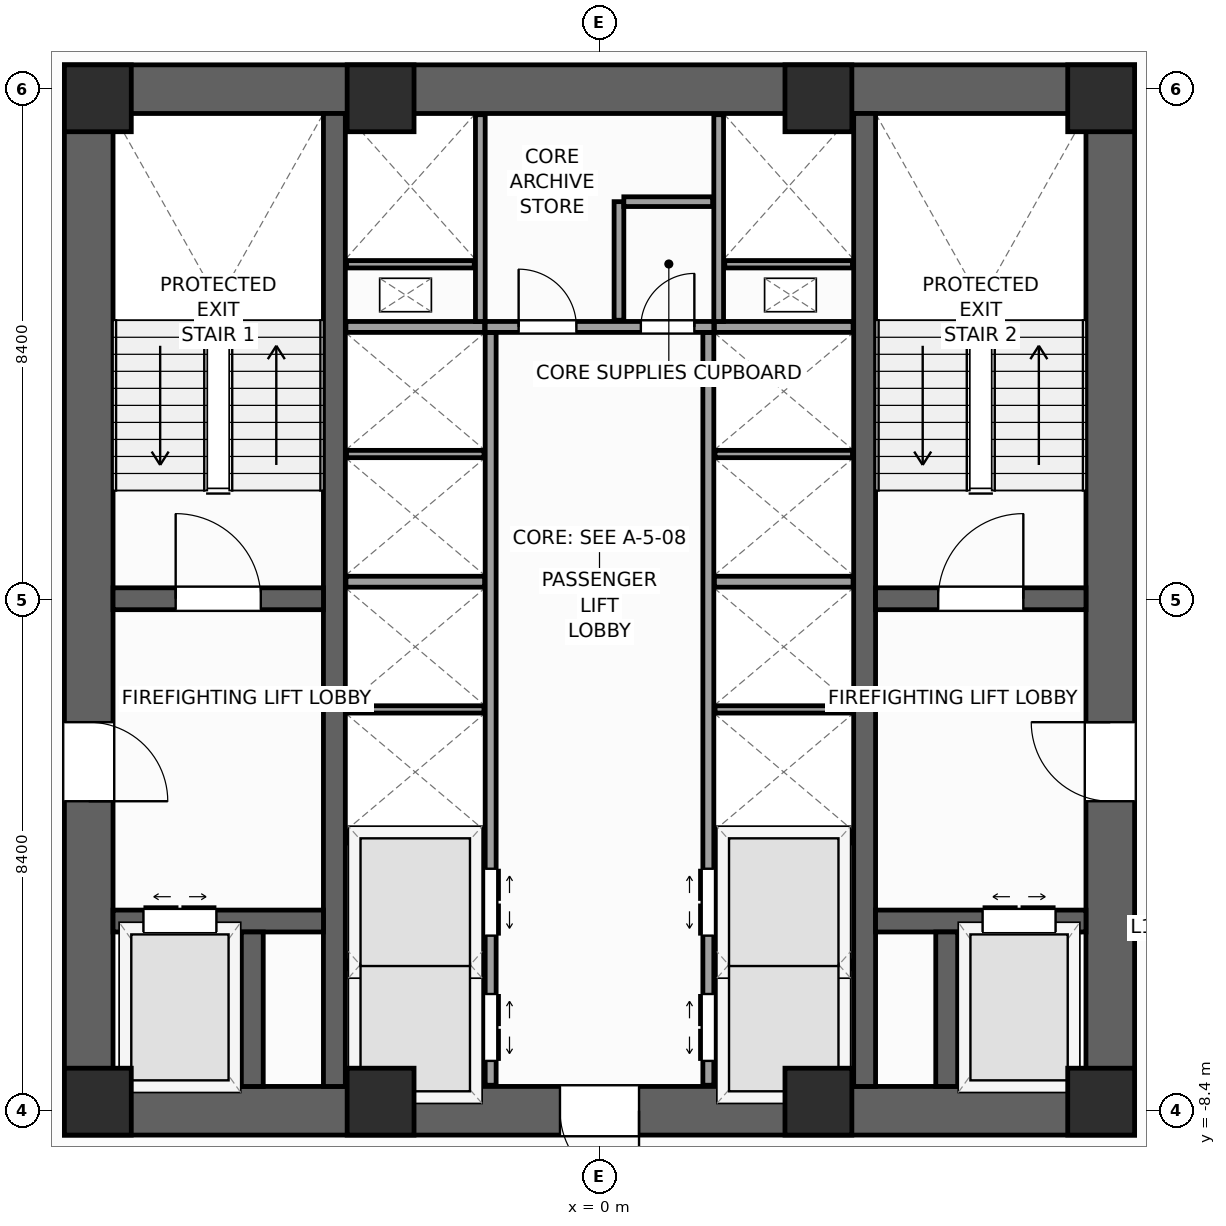
"""IFC4 building model, lengths in metres.
Left out: names, types, materials, properties, quantities, classifications, styles, units other than length and angle.
Written with IfcOpenShell. Run it as: python <this file> out.ifc"""

import sys

from ifc_helpers import new_model, si_unit, direction, frame, frame_2d, origin, origin_2d, place, context, subcontext, project, spatial, rectangle, extrude, source, transform, mapped, element, fill, save


model = new_model("IFC4")
c1 = context("Model", 3, precision=1e-05, world=origin(), true_north=direction((0.0, 1.0)))
c2 = subcontext(c1, "Body", "Model", "MODEL_VIEW")
j1 = project(units=[si_unit("LENGTHUNIT", "METRE"), si_unit("PLANEANGLEUNIT", "RADIAN")], contexts=[c1])
p1 = place(None, origin())
s1 = spatial("IfcSite", under=j1, at=p1, CompositionType="ELEMENT")
p2 = place(p1, origin())
s2 = spatial("IfcBuilding", under=s1, at=p2, CompositionType="ELEMENT")
p3 = place(p2, frame((0.0, 0.0, 54.0)))
s3 = spatial("IfcBuildingStorey", under=s2, at=p3, CompositionType="ELEMENT", Elevation=54.0)
p4 = place(p3, frame((-8.8, -8.4, 0.0), z_axis=(0.0, 0.0, 1.0), x_axis=(1.0, 0.0, 0.0)))
e1 = element("IfcWall", 1, at=p4, inside=s3, PredefinedType="SHEAR", context=c2, shape_type="SweptSolid", body=[
    extrude(rectangle(XDim=17.6, YDim=0.8, at=frame_2d((8.8, 0.0))), origin(), (0.0, 0.0, 1.0), 4.0),
])
p5 = place(p4, frame((8.15, 0.0, 0.0)))
e2 = element("IfcOpeningElement", 2, at=p5, cuts=e1, PredefinedType="OPENING", context=c2, shape_type="SweptSolid", body=[
    extrude(rectangle(XDim=1.3, YDim=2.2, at=frame_2d((0.65, 1.1))), frame((0.0, 0.41, 0.0), z_axis=(0.0, -1.0, 0.0), x_axis=(1.0, 0.0, 0.0)), (0.0, 0.0, 1.0), 0.82),
])
p6 = place(p3, frame((-8.8, 8.4, 0.0), z_axis=(0.0, 0.0, 1.0), x_axis=(1.0, 0.0, 0.0)))
e3 = element("IfcWall", 3, at=p6, inside=s3, PredefinedType="SHEAR", context=c2, shape_type="SweptSolid", body=[
    extrude(rectangle(XDim=17.6, YDim=0.8, at=frame_2d((8.8, 0.0))), origin(), (0.0, 0.0, 1.0), 4.0),
])
p7 = place(p3, frame((-8.4, -8.0, 0.0), z_axis=(0.0, 0.0, 1.0), x_axis=(0.0, 1.0, 0.0)))
e4 = element("IfcWall", 4, at=p7, inside=s3, PredefinedType="SHEAR", context=c2, shape_type="SweptSolid", body=[
    extrude(rectangle(XDim=16.0, YDim=0.8, at=frame_2d((8.0, 0.0))), origin(), (0.0, 0.0, 1.0), 4.0),
])
p8 = place(p7, frame((4.69, 0.0, 0.0)))
e5 = element("IfcOpeningElement", 5, at=p8, cuts=e4, PredefinedType="OPENING", context=c2, shape_type="SweptSolid", body=[
    extrude(rectangle(XDim=1.3, YDim=2.2, at=frame_2d((0.65, 1.1))), frame((0.0, 0.41, 0.0), z_axis=(0.0, -1.0, 0.0), x_axis=(1.0, 0.0, 0.0)), (0.0, 0.0, 1.0), 0.82),
])
p9 = place(p3, frame((8.4, -8.0, 0.0), z_axis=(0.0, 0.0, 1.0), x_axis=(0.0, 1.0, 0.0)))
e6 = element("IfcWall", 6, at=p9, inside=s3, PredefinedType="SHEAR", context=c2, shape_type="SweptSolid", body=[
    extrude(rectangle(XDim=16.0, YDim=0.8, at=frame_2d((8.0, 0.0))), origin(), (0.0, 0.0, 1.0), 4.0),
])
p10 = place(p9, frame((4.69, 0.0, 0.0)))
e7 = element("IfcOpeningElement", 7, at=p10, cuts=e6, PredefinedType="OPENING", context=c2, shape_type="SweptSolid", body=[
    extrude(rectangle(XDim=1.3, YDim=2.2, at=frame_2d((0.65, 1.1))), frame((0.0, 0.41, 0.0), z_axis=(0.0, -1.0, 0.0), x_axis=(1.0, 0.0, 0.0)), (0.0, 0.0, 1.0), 0.82),
])
for number, where, z_axis, x_axis in (
    (8, (-4.36, -8.0, 0.0), (0.0, 0.0, 1.0), (0.0, 1.0, 0.0)),
    (9, (4.36, -8.0, 0.0), (0.0, 0.0, 1.0), (0.0, 1.0, 0.0)),
):
    element("IfcWall", number, at=place(p3, frame(where, z_axis=z_axis, x_axis=x_axis)), inside=s3, PredefinedType="SHEAR", context=c2, shape_type="SweptSolid", body=[
        extrude(rectangle(XDim=16.0, YDim=0.36, at=frame_2d((8.0, 0.0))), origin(), (0.0, 0.0, 1.0), 4.0),
    ])
p11 = place(p3, frame((-8.0, 0.02, 0.0), z_axis=(0.0, 0.0, 1.0), x_axis=(1.0, 0.0, 0.0)))
e10 = element("IfcWall", 10, at=p11, inside=s3, PredefinedType="SHEAR", context=c2, shape_type="SweptSolid", body=[
    extrude(rectangle(XDim=3.46, YDim=0.36, at=frame_2d((1.73, 0.0))), origin(), (0.0, 0.0, 1.0), 4.0),
])
p12 = place(p11, frame((1.03, 0.0, 0.0)))
e11 = element("IfcOpeningElement", 11, at=p12, cuts=e10, PredefinedType="OPENING", context=c2, shape_type="SweptSolid", body=[
    extrude(rectangle(XDim=1.4, YDim=2.2, at=frame_2d((0.7, 1.1))), frame((0.0, 0.19, 0.0), z_axis=(0.0, -1.0, 0.0), x_axis=(1.0, 0.0, 0.0)), (0.0, 0.0, 1.0), 0.38),
])
p13 = place(p3, frame((4.54, 0.02, 0.0), z_axis=(0.0, 0.0, 1.0), x_axis=(1.0, 0.0, 0.0)))
e12 = element("IfcWall", 12, at=p13, inside=s3, PredefinedType="SHEAR", context=c2, shape_type="SweptSolid", body=[
    extrude(rectangle(XDim=3.46, YDim=0.36, at=frame_2d((1.73, 0.0))), origin(), (0.0, 0.0, 1.0), 4.0),
])
p14 = place(p13, frame((1.03, 0.0, 0.0)))
e13 = element("IfcOpeningElement", 13, at=p14, cuts=e12, PredefinedType="OPENING", context=c2, shape_type="SweptSolid", body=[
    extrude(rectangle(XDim=1.4, YDim=2.2, at=frame_2d((0.7, 1.1))), frame((0.0, 0.19, 0.0), z_axis=(0.0, -1.0, 0.0), x_axis=(1.0, 0.0, 0.0)), (0.0, 0.0, 1.0), 0.38),
])
p15 = place(p3, frame((-8.0, -5.28, 0.0), z_axis=(0.0, 0.0, 1.0), x_axis=(1.0, 0.0, 0.0)))
e14 = element("IfcWall", 14, at=p15, inside=s3, PredefinedType="SHEAR", context=c2, shape_type="SweptSolid", body=[
    extrude(rectangle(XDim=3.46, YDim=0.36, at=frame_2d((1.73, 0.0))), origin(), (0.0, 0.0, 1.0), 4.0),
])
p16 = place(p15, frame((0.5, 0.0, 0.0)))
e15 = element("IfcOpeningElement", 15, at=p16, cuts=e14, PredefinedType="OPENING", context=c2, shape_type="SweptSolid", body=[
    extrude(rectangle(XDim=1.2, YDim=2.25, at=frame_2d((0.6, 1.125))), frame((0.0, 0.19, 0.0), z_axis=(0.0, -1.0, 0.0), x_axis=(1.0, 0.0, 0.0)), (0.0, 0.0, 1.0), 0.38),
])
p17 = place(p3, frame((4.54, -5.28, 0.0), z_axis=(0.0, 0.0, 1.0), x_axis=(1.0, 0.0, 0.0)))
e16 = element("IfcWall", 16, at=p17, inside=s3, PredefinedType="SHEAR", context=c2, shape_type="SweptSolid", body=[
    extrude(rectangle(XDim=3.46, YDim=0.36, at=frame_2d((1.73, 0.0))), origin(), (0.0, 0.0, 1.0), 4.0),
])
p18 = place(p17, frame((1.76, 0.0, 0.0)))
e17 = element("IfcOpeningElement", 17, at=p18, cuts=e16, PredefinedType="OPENING", context=c2, shape_type="SweptSolid", body=[
    extrude(rectangle(XDim=1.2, YDim=2.25, at=frame_2d((0.6, 1.125))), frame((0.0, 0.19, 0.0), z_axis=(0.0, -1.0, 0.0), x_axis=(1.0, 0.0, 0.0)), (0.0, 0.0, 1.0), 0.38),
])
for number, where, z_axis, x_axis in (
    (18, (-5.71, -8.0, 0.0), (0.0, 0.0, 1.0), (0.0, 1.0, 0.0)),
    (19, (5.71, -8.0, 0.0), (0.0, 0.0, 1.0), (0.0, 1.0, 0.0)),
):
    element("IfcWall", number, at=place(p3, frame(where, z_axis=z_axis, x_axis=x_axis)), inside=s3, PredefinedType="SHEAR", context=c2, shape_type="SweptSolid", body=[
        extrude(rectangle(XDim=2.54, YDim=0.36, at=frame_2d((1.27, 0.0))), origin(), (0.0, 0.0, 1.0), 4.0),
    ])
m1 = source(origin(), c2, "Body", "SweptSolid", [
    extrude(rectangle(XDim=1.1, YDim=1.1, at=origin_2d()), origin(), (0.0, 0.0, 1.0), 4.0),
])
for number, where, z_axis, x_axis in (
    (20, (-8.25, -8.25, 0.0), (0.0, 0.0, 1.0), (1.0, 0.0, 0.0)),
    (21, (8.25, -8.25, 0.0), (0.0, 0.0, 1.0), (1.0, 0.0, 0.0)),
    (22, (8.25, 8.25, 0.0), (0.0, 0.0, 1.0), (1.0, 0.0, 0.0)),
    (23, (-8.25, 8.25, 0.0), (0.0, 0.0, 1.0), (1.0, 0.0, 0.0)),
    (24, (-3.6, -8.25, 0.0), (0.0, 0.0, 1.0), (1.0, 0.0, 0.0)),
    (25, (3.6, -8.25, 0.0), (0.0, 0.0, 1.0), (1.0, 0.0, 0.0)),
    (26, (-3.6, 8.25, 0.0), (0.0, 0.0, 1.0), (1.0, 0.0, 0.0)),
    (27, (3.6, 8.25, 0.0), (0.0, 0.0, 1.0), (1.0, 0.0, 0.0)),
):
    element("IfcColumn", number, at=place(p3, frame(where, z_axis=z_axis, x_axis=x_axis)), inside=s3, PredefinedType="PILASTER", context=c2, shape_type="MappedRepresentation", body=[
        mapped(m1, transform((0.0, 0.0, 0.0), scale=1.0)),
    ])
p19 = place(p3, frame((-1.79, -7.98, 0.0), z_axis=(0.0, 0.0, 1.0), x_axis=(0.0, 1.0, 0.0)))
e28 = element("IfcWall", 28, at=p19, inside=s3, PredefinedType="PARTITIONING", context=c2, shape_type="SweptSolid", body=[
    extrude(rectangle(XDim=12.38, YDim=0.18, at=frame_2d((6.19, 0.0))), origin(), (0.0, 0.0, 1.0), 3.72),
])
p20 = place(p19, frame((0.4, 0.0, 0.0)))
e29 = element("IfcOpeningElement", 29, at=p20, cuts=e28, PredefinedType="OPENING", context=c2, shape_type="SweptSolid", body=[
    extrude(rectangle(XDim=1.1, YDim=2.2, at=frame_2d((0.55, 1.1))), frame((0.0, 0.1, 0.0), z_axis=(0.0, -1.0, 0.0), x_axis=(1.0, 0.0, 0.0)), (0.0, 0.0, 1.0), 0.2),
])
p21 = place(p19, frame((2.46, 0.0, 0.0)))
e30 = element("IfcOpeningElement", 30, at=p21, cuts=e28, PredefinedType="OPENING", context=c2, shape_type="SweptSolid", body=[
    extrude(rectangle(XDim=1.1, YDim=2.2, at=frame_2d((0.55, 1.1))), frame((0.0, 0.1, 0.0), z_axis=(0.0, -1.0, 0.0), x_axis=(1.0, 0.0, 0.0)), (0.0, 0.0, 1.0), 0.2),
])
p22 = place(p3, frame((1.79, -7.98, 0.0), z_axis=(0.0, 0.0, 1.0), x_axis=(0.0, 1.0, 0.0)))
e31 = element("IfcWall", 31, at=p22, inside=s3, PredefinedType="PARTITIONING", context=c2, shape_type="SweptSolid", body=[
    extrude(rectangle(XDim=12.38, YDim=0.18, at=frame_2d((6.19, 0.0))), origin(), (0.0, 0.0, 1.0), 3.72),
])
p23 = place(p22, frame((0.4, 0.0, 0.0)))
e32 = element("IfcOpeningElement", 32, at=p23, cuts=e31, PredefinedType="OPENING", context=c2, shape_type="SweptSolid", body=[
    extrude(rectangle(XDim=1.1, YDim=2.2, at=frame_2d((0.55, 1.1))), frame((0.0, 0.1, 0.0), z_axis=(0.0, -1.0, 0.0), x_axis=(1.0, 0.0, 0.0)), (0.0, 0.0, 1.0), 0.2),
])
p24 = place(p22, frame((2.46, 0.0, 0.0)))
e33 = element("IfcOpeningElement", 33, at=p24, cuts=e31, PredefinedType="OPENING", context=c2, shape_type="SweptSolid", body=[
    extrude(rectangle(XDim=1.1, YDim=2.2, at=frame_2d((0.55, 1.1))), frame((0.0, 0.1, 0.0), z_axis=(0.0, -1.0, 0.0), x_axis=(1.0, 0.0, 0.0)), (0.0, 0.0, 1.0), 0.2),
])
p25 = place(p3, frame((-1.88, 4.49, 0.0), z_axis=(0.0, 0.0, 1.0), x_axis=(1.0, 0.0, 0.0)))
e34 = element("IfcWall", 34, at=p25, inside=s3, PredefinedType="PARTITIONING", context=c2, shape_type="SweptSolid", body=[
    extrude(rectangle(XDim=3.76, YDim=0.18, at=frame_2d((1.88, 0.0))), origin(), (0.0, 0.0, 1.0), 3.72),
])
p26 = place(p25, frame((0.55, 0.0, 0.0)))
e35 = element("IfcOpeningElement", 35, at=p26, cuts=e34, PredefinedType="OPENING", context=c2, shape_type="SweptSolid", body=[
    extrude(rectangle(XDim=0.95, YDim=2.1, at=frame_2d((0.475, 1.05))), frame((0.0, 0.1, 0.0), z_axis=(0.0, -1.0, 0.0), x_axis=(1.0, 0.0, 0.0)), (0.0, 0.0, 1.0), 0.2),
])
p27 = place(p25, frame((2.56, 0.0, 0.0)))
e36 = element("IfcOpeningElement", 36, at=p27, cuts=e34, PredefinedType="OPENING", context=c2, shape_type="SweptSolid", body=[
    extrude(rectangle(XDim=0.88, YDim=2.1, at=frame_2d((0.44, 1.05))), frame((0.0, 0.1, 0.0), z_axis=(0.0, -1.0, 0.0), x_axis=(1.0, 0.0, 0.0)), (0.0, 0.0, 1.0), 0.2),
])
for number, where, z_axis, x_axis in (
    (37, (-4.17, -3.9, 0.0), (0.0, 0.0, 1.0), (1.0, 0.0, 0.0)),
    (38, (1.89, -3.9, 0.0), (0.0, 0.0, 1.0), (1.0, 0.0, 0.0)),
    (39, (-4.17, 0.3, 0.0), (0.0, 0.0, 1.0), (1.0, 0.0, 0.0)),
    (40, (1.89, 0.3, 0.0), (0.0, 0.0, 1.0), (1.0, 0.0, 0.0)),
    (41, (-4.17, 4.49, 0.0), (0.0, 0.0, 1.0), (1.0, 0.0, 0.0)),
    (42, (1.89, 4.49, 0.0), (0.0, 0.0, 1.0), (1.0, 0.0, 0.0)),
):
    element("IfcWall", number, at=place(p3, frame(where, z_axis=z_axis, x_axis=x_axis)), inside=s3, PredefinedType="PARTITIONING", context=c2, shape_type="SweptSolid", body=[
        extrude(rectangle(XDim=2.28, YDim=0.18, at=frame_2d((1.14, 0.0))), origin(), (0.0, 0.0, 1.0), 3.72),
    ])
for number, where, z_axis, x_axis in (
    (43, (-4.16, -6.0, 0.0), (0.0, 0.0, 1.0), (1.0, 0.0, 0.0)),
    (44, (1.9, -6.0, 0.0), (0.0, 0.0, 1.0), (1.0, 0.0, 0.0)),
    (45, (-4.16, -1.8, 0.0), (0.0, 0.0, 1.0), (1.0, 0.0, 0.0)),
    (46, (1.9, -1.8, 0.0), (0.0, 0.0, 1.0), (1.0, 0.0, 0.0)),
    (47, (-4.16, 2.4, 0.0), (0.0, 0.0, 1.0), (1.0, 0.0, 0.0)),
    (48, (1.9, 2.4, 0.0), (0.0, 0.0, 1.0), (1.0, 0.0, 0.0)),
):
    element("IfcWall", number, at=place(p3, frame(where, z_axis=z_axis, x_axis=x_axis)), inside=s3, PredefinedType="PARTITIONING", context=c2, shape_type="SweptSolid", body=[
        extrude(rectangle(XDim=2.26, YDim=0.12, at=frame_2d((1.13, 0.0))), origin(), (0.0, 0.0, 1.0), 3.72),
    ])
for number, where, z_axis, x_axis in (
    (49, (-1.96, 4.58, 0.0), (0.0, 0.0, 1.0), (0.0, 1.0, 0.0)),
    (50, (1.96, 4.58, 0.0), (0.0, 0.0, 1.0), (0.0, 1.0, 0.0)),
):
    element("IfcWall", number, at=place(p3, frame(where, z_axis=z_axis, x_axis=x_axis)), inside=s3, PredefinedType="PARTITIONING", context=c2, shape_type="SweptSolid", body=[
        extrude(rectangle(XDim=3.4, YDim=0.16, at=frame_2d((1.7, 0.0))), origin(), (0.0, 0.0, 1.0), 3.72),
    ])
for number, where, z_axis, x_axis in (
    (51, (-4.16, 5.52, 0.0), (0.0, 0.0, 1.0), (1.0, 0.0, 0.0)),
    (52, (2.06, 5.52, 0.0), (0.0, 0.0, 1.0), (1.0, 0.0, 0.0)),
):
    element("IfcWall", number, at=place(p3, frame(where, z_axis=z_axis, x_axis=x_axis)), inside=s3, PredefinedType="PARTITIONING", context=c2, shape_type="SweptSolid", body=[
        extrude(rectangle(XDim=2.1, YDim=0.12, at=frame_2d((1.05, 0.0))), origin(), (0.0, 0.0, 1.0), 3.72),
    ])
p28 = place(p3, frame((0.32, 4.6, 0.0), z_axis=(0.0, 0.0, 1.0), x_axis=(0.0, 1.0, 0.0)))
e53 = element("IfcWall", 53, at=p28, inside=s3, PredefinedType="PARTITIONING", context=c2, shape_type="SweptSolid", body=[
    extrude(rectangle(XDim=1.95, YDim=0.16, at=frame_2d((0.975, 0.0))), origin(), (0.0, 0.0, 1.0), 3.72),
])
p29 = place(p3, frame((0.4, 6.55, 0.0), z_axis=(0.0, 0.0, 1.0), x_axis=(1.0, 0.0, 0.0)))
e54 = element("IfcWall", 54, at=p29, inside=s3, PredefinedType="PARTITIONING", context=c2, shape_type="SweptSolid", body=[
    extrude(rectangle(XDim=1.46, YDim=0.16, at=frame_2d((0.73, 0.0))), origin(), (0.0, 0.0, 1.0), 3.72),
])
m2 = source(origin(), c2, "Body", "SweptSolid", [
    extrude(rectangle(XDim=1.4, YDim=2.2, at=frame_2d((0.7, 1.1))), frame((0.0, 0.025, 0.0), z_axis=(0.0, -1.0, 0.0), x_axis=(1.0, 0.0, 0.0)), (0.0, 0.0, 1.0), 0.05),
])
p30 = place(p12, origin())
e55 = element("IfcDoor", 55, at=p30, inside=s3, OperationType="SINGLE_SWING_LEFT", PredefinedType="DOOR", context=c2, shape_type="MappedRepresentation", body=[
    mapped(m2, transform((0.0, 0.0, 0.0), scale=1.0)),
])
fill(e11, e55)
p31 = place(p14, origin())
e56 = element("IfcDoor", 56, at=p31, inside=s3, OperationType="SINGLE_SWING_RIGHT", PredefinedType="DOOR", context=c2, shape_type="MappedRepresentation", body=[
    mapped(m2, transform((0.0, 0.0, 0.0), scale=1.0)),
])
fill(e13, e56)
m3 = source(origin(), c2, "Body", "SweptSolid", [
    extrude(rectangle(XDim=1.3, YDim=2.2, at=frame_2d((0.65, 1.1))), frame((0.0, 0.025, 0.0), z_axis=(0.0, -1.0, 0.0), x_axis=(1.0, 0.0, 0.0)), (0.0, 0.0, 1.0), 0.05),
])
p32 = place(p8, frame((1.3, 0.0, 0.0), z_axis=(0.0, 0.0, 1.0), x_axis=(-1.0, 0.0, 0.0)))
e57 = element("IfcDoor", 57, at=p32, inside=s3, OperationType="SINGLE_SWING_LEFT", PredefinedType="DOOR", context=c2, shape_type="MappedRepresentation", body=[
    mapped(m3, transform((0.0, 0.0, 0.0), scale=1.0)),
])
fill(e5, e57)
p33 = place(p10, origin())
e58 = element("IfcDoor", 58, at=p33, inside=s3, OperationType="SINGLE_SWING_RIGHT", PredefinedType="DOOR", context=c2, shape_type="MappedRepresentation", body=[
    mapped(m3, transform((0.0, 0.0, 0.0), scale=1.0)),
])
fill(e7, e58)
p34 = place(p5, frame((1.3, 0.0, 0.0), z_axis=(0.0, 0.0, 1.0), x_axis=(-1.0, 0.0, 0.0)))
e59 = element("IfcDoor", 59, at=p34, inside=s3, OperationType="SINGLE_SWING_RIGHT", PredefinedType="DOOR", context=c2, shape_type="MappedRepresentation", body=[
    mapped(m3, transform((0.0, 0.0, 0.0), scale=1.0)),
])
fill(e2, e59)
m4 = source(origin(), c2, "Body", "SweptSolid", [
    extrude(rectangle(XDim=1.2, YDim=2.25, at=frame_2d((0.6, 1.125))), frame((0.0, 0.025, 0.0), z_axis=(0.0, -1.0, 0.0), x_axis=(1.0, 0.0, 0.0)), (0.0, 0.0, 1.0), 0.05),
])
p35 = place(p16, origin())
e60 = element("IfcDoor", 60, at=p35, inside=s3, OperationType="DOUBLE_DOOR_SLIDING", PredefinedType="DOOR", context=c2, shape_type="MappedRepresentation", body=[
    mapped(m4, transform((0.0, 0.0, 0.0), scale=1.0)),
])
fill(e15, e60)
p36 = place(p18, origin())
e61 = element("IfcDoor", 61, at=p36, inside=s3, OperationType="DOUBLE_DOOR_SLIDING", PredefinedType="DOOR", context=c2, shape_type="MappedRepresentation", body=[
    mapped(m4, transform((0.0, 0.0, 0.0), scale=1.0)),
])
fill(e17, e61)
m5 = source(origin(), c2, "Body", "SweptSolid", [
    extrude(rectangle(XDim=1.1, YDim=2.2, at=frame_2d((0.55, 1.1))), frame((0.0, 0.025, 0.0), z_axis=(0.0, -1.0, 0.0), x_axis=(1.0, 0.0, 0.0)), (0.0, 0.0, 1.0), 0.05),
])
p37 = place(p20, frame((1.1, 0.0, 0.0), z_axis=(0.0, 0.0, 1.0), x_axis=(-1.0, 0.0, 0.0)))
e62 = element("IfcDoor", 62, at=p37, inside=s3, OperationType="DOUBLE_DOOR_SLIDING", PredefinedType="DOOR", context=c2, shape_type="MappedRepresentation", body=[
    mapped(m5, transform((0.0, 0.0, 0.0), scale=1.0)),
])
fill(e29, e62)
p38 = place(p21, frame((1.1, 0.0, 0.0), z_axis=(0.0, 0.0, 1.0), x_axis=(-1.0, 0.0, 0.0)))
e63 = element("IfcDoor", 63, at=p38, inside=s3, OperationType="DOUBLE_DOOR_SLIDING", PredefinedType="DOOR", context=c2, shape_type="MappedRepresentation", body=[
    mapped(m5, transform((0.0, 0.0, 0.0), scale=1.0)),
])
fill(e30, e63)
p39 = place(p23, origin())
e64 = element("IfcDoor", 64, at=p39, inside=s3, OperationType="DOUBLE_DOOR_SLIDING", PredefinedType="DOOR", context=c2, shape_type="MappedRepresentation", body=[
    mapped(m5, transform((0.0, 0.0, 0.0), scale=1.0)),
])
fill(e32, e64)
p40 = place(p24, origin())
e65 = element("IfcDoor", 65, at=p40, inside=s3, OperationType="DOUBLE_DOOR_SLIDING", PredefinedType="DOOR", context=c2, shape_type="MappedRepresentation", body=[
    mapped(m5, transform((0.0, 0.0, 0.0), scale=1.0)),
])
fill(e33, e65)
m6 = source(origin(), c2, "Body", "SweptSolid", [
    extrude(rectangle(XDim=0.95, YDim=2.1, at=frame_2d((0.475, 1.05))), frame((0.0, 0.025, 0.0), z_axis=(0.0, -1.0, 0.0), x_axis=(1.0, 0.0, 0.0)), (0.0, 0.0, 1.0), 0.05),
])
p41 = place(p26, origin())
e66 = element("IfcDoor", 66, at=p41, inside=s3, OperationType="SINGLE_SWING_LEFT", PredefinedType="DOOR", context=c2, shape_type="MappedRepresentation", body=[
    mapped(m6, transform((0.0, 0.0, 0.0), scale=1.0)),
])
fill(e35, e66)
m7 = source(origin(), c2, "Body", "SweptSolid", [
    extrude(rectangle(XDim=0.88, YDim=2.1, at=frame_2d((0.44, 1.05))), frame((0.0, 0.025, 0.0), z_axis=(0.0, -1.0, 0.0), x_axis=(1.0, 0.0, 0.0)), (0.0, 0.0, 1.0), 0.05),
])
p42 = place(p27, origin())
e67 = element("IfcDoor", 67, at=p42, inside=s3, OperationType="SINGLE_SWING_RIGHT", PredefinedType="DOOR", context=c2, shape_type="MappedRepresentation", body=[
    mapped(m7, transform((0.0, 0.0, 0.0), scale=1.0)),
])
fill(e36, e67)
save(model, sys.argv[1])
